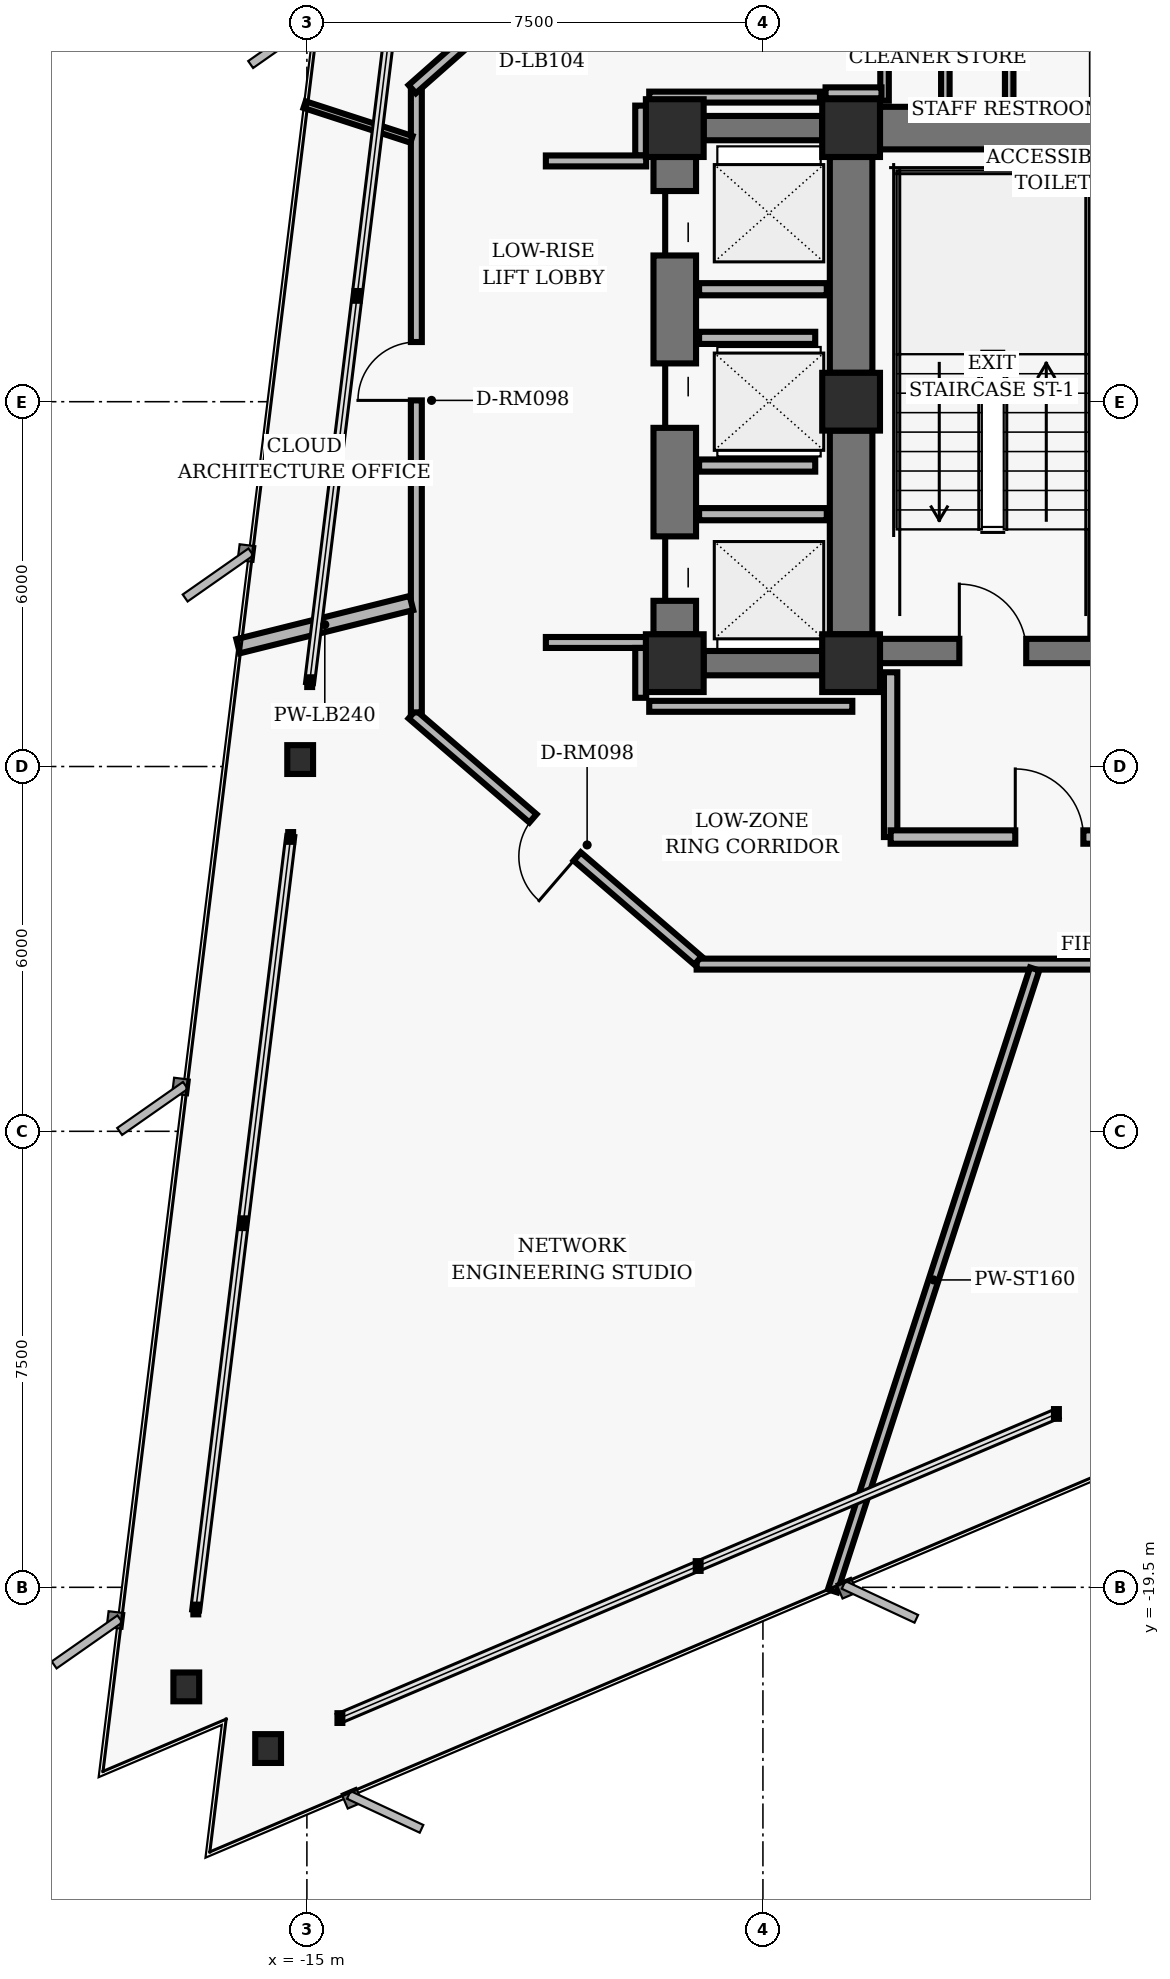
"""IFC4 building model, lengths in metres.
Left out: names, types, materials, properties, quantities, classifications, styles, units other than length and angle.
Written with IfcOpenShell. Run it as: python <this file> out.ifc"""

import sys

from ifc_helpers import new_model, si_unit, direction, frame, frame_2d, origin, origin_2d, place, context, subcontext, project, spatial, rectangle, hollow_rectangle, i_section, extrude, element, fill, save


model = new_model("IFC4")
c1 = context("Model", 3, precision=1e-05, world=origin(), true_north=direction((0.0, 1.0)))
c2 = subcontext(c1, "Body", "Model", "MODEL_VIEW")
j1 = project(units=[si_unit("LENGTHUNIT", "METRE"), si_unit("PLANEANGLEUNIT", "RADIAN")], contexts=[c1])
p1 = place(None, origin())
s1 = spatial("IfcSite", under=j1, at=p1, CompositionType="ELEMENT")
p2 = place(p1, origin())
s2 = spatial("IfcBuilding", under=s1, at=p2, CompositionType="ELEMENT")
p3 = place(p2, frame((0.0, 0.0, 52.96)))
s3 = spatial("IfcBuildingStorey", under=s2, at=p3, CompositionType="ELEMENT", Elevation=52.96)
for number, where, z_axis, x_axis in (
    (1, (-6.05, 4.5, 0.0), (0.0, 0.0, 1.0), (1.0, 0.0, 0.0)),
    (2, (-6.05, 0.0, 0.0), (0.0, 0.0, 1.0), (1.0, 0.0, 0.0)),
    (3, (-6.05, -4.3, 0.0), (0.0, 0.0, 1.0), (1.0, 0.0, 0.0)),
    (4, (-8.95, 4.5, 0.0), (0.0, 0.0, 1.0), (1.0, 0.0, 0.0)),
    (5, (-8.95, -4.3, 0.0), (0.0, 0.0, 1.0), (1.0, 0.0, 0.0)),
):
    element("IfcColumn", number, at=place(p3, frame(where, z_axis=z_axis, x_axis=x_axis)), inside=s3, PredefinedType="COLUMN", context=c2, shape_type="SweptSolid", body=[
        extrude(hollow_rectangle(XDim=0.95, YDim=0.95, WallThickness=0.06, InnerFilletRadius=0.02, OuterFilletRadius=0.04, at=origin_2d()), origin(), (0.0, 0.0, 1.0), 3.36),
    ])
p4 = place(p3, frame((-6.05, 0.475, 0.0), z_axis=(0.0, 0.0, 1.0), x_axis=(0.0, 1.0, 0.0)))
e6 = element("IfcWall", 6, at=p4, inside=s3, PredefinedType="SHEAR", context=c2, shape_type="SweptSolid", body=[
    extrude(rectangle(XDim=3.55, YDim=0.7, at=frame_2d((1.775, 0.0))), origin(), (0.0, 0.0, 1.0), 3.098),
])
p5 = place(p3, frame((-6.05, -3.825, 0.0), z_axis=(0.0, 0.0, 1.0), x_axis=(0.0, 1.0, 0.0)))
e7 = element("IfcWall", 7, at=p5, inside=s3, PredefinedType="SHEAR", context=c2, shape_type="SweptSolid", body=[
    extrude(rectangle(XDim=3.35, YDim=0.7, at=frame_2d((1.675, 0.0))), origin(), (0.0, 0.0, 1.0), 3.098),
])
p6 = place(p3, frame((-5.575, -4.1, 0.0), z_axis=(0.0, 0.0, 1.0), x_axis=(1.0, 0.0, 0.0)))
e8 = element("IfcWall", 8, at=p6, inside=s3, PredefinedType="SHEAR", context=c2, shape_type="SweptSolid", body=[
    extrude(rectangle(XDim=11.15, YDim=0.4, at=frame_2d((5.575, 0.0))), origin(), (0.0, 0.0, 1.0), 3.098),
])
p7 = place(p6, frame((1.305, 0.0, 0.0)))
e9 = element("IfcOpeningElement", 9, at=p7, cuts=e8, PredefinedType="OPENING", context=c2, shape_type="SweptSolid", body=[
    extrude(rectangle(XDim=1.1, YDim=2.04, at=frame_2d((0.55, 1.02))), frame((0.0, 0.21, 0.0), z_axis=(0.0, -1.0, 0.0), x_axis=(1.0, 0.0, 0.0)), (0.0, 0.0, 1.0), 0.42),
])
p8 = place(p6, frame((8.745, 0.0, 0.0)))
e10 = element("IfcOpeningElement", 10, at=p8, cuts=e8, PredefinedType="OPENING", context=c2, shape_type="SweptSolid", body=[
    extrude(rectangle(XDim=1.1, YDim=2.04, at=frame_2d((0.55, 1.02))), frame((0.0, 0.21, 0.0), z_axis=(0.0, -1.0, 0.0), x_axis=(1.0, 0.0, 0.0)), (0.0, 0.0, 1.0), 0.42),
])
p9 = place(p6, frame((4.045, 0.0, 0.0)))
e11 = element("IfcOpeningElement", 11, at=p9, cuts=e8, PredefinedType="OPENING", context=c2, shape_type="SweptSolid", body=[
    extrude(rectangle(XDim=1.06, YDim=2.04, at=frame_2d((0.53, 1.02))), frame((0.0, 0.21, 0.0), z_axis=(0.0, -1.0, 0.0), x_axis=(1.0, 0.0, 0.0)), (0.0, 0.0, 1.0), 0.42),
])
p10 = place(p6, frame((6.045, 0.0, 0.0)))
e12 = element("IfcOpeningElement", 12, at=p10, cuts=e8, PredefinedType="OPENING", context=c2, shape_type="SweptSolid", body=[
    extrude(rectangle(XDim=1.06, YDim=2.04, at=frame_2d((0.53, 1.02))), frame((0.0, 0.21, 0.0), z_axis=(0.0, -1.0, 0.0), x_axis=(1.0, 0.0, 0.0)), (0.0, 0.0, 1.0), 0.42),
])
p11 = place(p3, frame((-5.575, 4.5, 0.0), z_axis=(0.0, 0.0, 1.0), x_axis=(1.0, 0.0, 0.0)))
e13 = element("IfcWall", 13, at=p11, inside=s3, PredefinedType="SHEAR", context=c2, shape_type="SweptSolid", body=[
    extrude(rectangle(XDim=3.525, YDim=0.7, at=frame_2d((1.762, 0.0))), origin(), (0.0, 0.0, 1.0), 3.098),
])
p12 = place(p3, frame((-8.95, -3.825, 0.0), z_axis=(0.0, 0.0, 1.0), x_axis=(0.0, 1.0, 0.0)))
e14 = element("IfcWall", 14, at=p12, inside=s3, PredefinedType="SHEAR", context=c2, shape_type="SweptSolid", body=[
    extrude(rectangle(XDim=7.85, YDim=0.7, at=frame_2d((3.925, 0.0))), origin(), (0.0, 0.0, 1.0), 3.098),
])
p13 = place(p12, frame((0.55, 0.0, 0.0)))
e15 = element("IfcOpeningElement", 15, at=p13, cuts=e14, PredefinedType="OPENING", context=c2, shape_type="SweptSolid", body=[
    extrude(rectangle(XDim=1.06, YDim=2.04, at=frame_2d((0.53, 1.02))), frame((0.0, 0.36, 0.0), z_axis=(0.0, -1.0, 0.0), x_axis=(1.0, 0.0, 0.0)), (0.0, 0.0, 1.0), 0.72),
])
p14 = place(p12, frame((3.395, 0.0, 0.0)))
e16 = element("IfcOpeningElement", 16, at=p14, cuts=e14, PredefinedType="OPENING", context=c2, shape_type="SweptSolid", body=[
    extrude(rectangle(XDim=1.06, YDim=2.04, at=frame_2d((0.53, 1.02))), frame((0.0, 0.36, 0.0), z_axis=(0.0, -1.0, 0.0), x_axis=(1.0, 0.0, 0.0)), (0.0, 0.0, 1.0), 0.72),
])
p15 = place(p12, frame((6.23, 0.0, 0.0)))
e17 = element("IfcOpeningElement", 17, at=p15, cuts=e14, PredefinedType="OPENING", context=c2, shape_type="SweptSolid", body=[
    extrude(rectangle(XDim=1.06, YDim=2.04, at=frame_2d((0.53, 1.02))), frame((0.0, 0.36, 0.0), z_axis=(0.0, -1.0, 0.0), x_axis=(1.0, 0.0, 0.0)), (0.0, 0.0, 1.0), 0.72),
])
for number, where, z_axis, x_axis in (
    (18, (-8.475, 4.5, 0.0), (0.0, 0.0, 1.0), (1.0, 0.0, 0.0)),
    (19, (-8.475, -4.3, 0.0), (0.0, 0.0, 1.0), (1.0, 0.0, 0.0)),
):
    element("IfcWall", number, at=place(p3, frame(where, z_axis=z_axis, x_axis=x_axis)), inside=s3, PredefinedType="SHEAR", context=c2, shape_type="SweptSolid", body=[
        extrude(rectangle(XDim=1.95, YDim=0.4, at=frame_2d((0.975, 0.0))), origin(), (0.0, 0.0, 1.0), 3.098),
    ])
for number, where, z_axis, x_axis in (
    (20, (-15.111, -5.886, 0.0), (0.0, 0.0, 1.0), (1.0, 0.0, 0.0)),
    (21, (-16.983, -21.138, 0.0), (0.0, 0.0, 1.0), (1.0, 0.0, 0.0)),
    (22, (-15.638, -22.152, 0.0), (0.0, 0.0, 1.0), (1.0, 0.0, 0.0)),
):
    element("IfcColumn", number, at=place(p3, frame(where, z_axis=z_axis, x_axis=x_axis)), inside=s3, PredefinedType="COLUMN", context=c2, shape_type="SweptSolid", body=[
        extrude(i_section(OverallWidth=0.424, OverallDepth=0.474, WebThickness=0.048, FlangeThickness=0.077, FilletRadius=0.025, at=origin_2d()), origin(), (0.0, 0.0, 1.0), 3.36),
    ])
p16 = place(p3, frame((-5.4, -7.16, 0.0), z_axis=(0.0, 0.0, 1.0), x_axis=(0.0, 1.0, 0.0)))
e23 = element("IfcWall", 23, at=p16, inside=s3, PredefinedType="PARTITIONING", context=c2, shape_type="SweptSolid", body=[
    extrude(rectangle(XDim=2.71, YDim=0.22, at=frame_2d((1.355, 0.0))), origin(), (0.0, 0.0, 1.0), 3.073),
])
p17 = place(p3, frame((-5.4, -7.16, 0.0), z_axis=(0.0, 0.0, 1.0), x_axis=(1.0, 0.0, 0.0)))
e24 = element("IfcWall", 24, at=p17, inside=s3, PredefinedType="PARTITIONING", context=c2, shape_type="SweptSolid", body=[
    extrude(rectangle(XDim=5.4, YDim=0.22, at=frame_2d((2.7, 0.0))), origin(), (0.0, 0.0, 1.0), 2.587),
])
p18 = place(p17, frame((2.05, 0.0, 0.0)))
e25 = element("IfcOpeningElement", 25, at=p18, cuts=e24, PredefinedType="OPENING", context=c2, shape_type="SweptSolid", body=[
    extrude(rectangle(XDim=1.12, YDim=2.02, at=frame_2d((0.56, 1.01))), frame((0.0, 0.12, 0.0), z_axis=(0.0, -1.0, 0.0), x_axis=(1.0, 0.0, 0.0)), (0.0, 0.0, 1.0), 0.24),
])
for number, where, z_axis, x_axis in (
    (26, (-5.5, 4.95, 0.0), (0.0, 0.0, 1.0), (0.0, 1.0, 0.0)),
    (27, (-4.5, 4.95, 0.0), (0.0, 0.0, 1.0), (0.0, 1.0, 0.0)),
    (28, (-3.45, 4.95, 0.0), (0.0, 0.0, 1.0), (0.0, 1.0, 0.0)),
):
    element("IfcWall", number, at=place(p3, frame(where, z_axis=z_axis, x_axis=x_axis)), inside=s3, PredefinedType="PARTITIONING", context=c2, shape_type="SweptSolid", body=[
        extrude(rectangle(XDim=2.1, YDim=0.14, at=frame_2d((1.05, 0.0))), origin(), (0.0, 0.0, 1.0), 3.073),
    ])
for number, where, z_axis, x_axis in (
    (29, (-8.55, -1.85, 0.0), (0.0, 0.0, 1.0), (1.0, 0.0, 0.0)),
    (30, (-8.55, 1.85, 0.0), (0.0, 0.0, 1.0), (1.0, 0.0, 0.0)),
):
    element("IfcWall", number, at=place(p3, frame(where, z_axis=z_axis, x_axis=x_axis)), inside=s3, PredefinedType="PARTITIONING", context=c2, shape_type="SweptSolid", body=[
        extrude(rectangle(XDim=2.1, YDim=0.2, at=frame_2d((1.05, 0.0))), origin(), (0.0, 0.0, 1.0), 3.073),
    ])
for number, where, z_axis, x_axis in (
    (31, (-8.55, -1.05, 0.0), (0.0, 0.0, 1.0), (1.0, 0.0, 0.0)),
    (32, (-8.55, 1.05, 0.0), (0.0, 0.0, 1.0), (1.0, 0.0, 0.0)),
):
    element("IfcWall", number, at=place(p3, frame(where, z_axis=z_axis, x_axis=x_axis)), inside=s3, PredefinedType="PARTITIONING", context=c2, shape_type="SweptSolid", body=[
        extrude(rectangle(XDim=1.91, YDim=0.2, at=frame_2d((0.955, 0.0))), origin(), (0.0, 0.0, 1.0), 3.073),
    ])
p19 = place(p3, frame((8.41, -9.25, 0.0), z_axis=(0.0, 0.0, 1.0), x_axis=(-1.0, 0.0, 0.0)))
e33 = element("IfcWall", 33, at=p19, inside=s3, PredefinedType="PARTITIONING", context=c2, shape_type="SweptSolid", body=[
    extrude(rectangle(XDim=17.0, YDim=0.18, at=frame_2d((8.5, 0.0))), origin(), (0.0, 0.0, 1.0), 2.587),
])
p20 = place(p19, frame((5.34, 0.0, 0.0)))
e34 = element("IfcOpeningElement", 34, at=p20, cuts=e33, PredefinedType="OPENING", context=c2, shape_type="SweptSolid", body=[
    extrude(rectangle(XDim=1.02, YDim=2.02, at=frame_2d((0.51, 1.01))), frame((0.0, 0.1, 0.0), z_axis=(0.0, -1.0, 0.0), x_axis=(1.0, 0.0, 0.0)), (0.0, 0.0, 1.0), 0.2),
])
p21 = place(p3, frame((-8.568, -9.191, 0.0), z_axis=(0.0, 0.0, 1.0), x_axis=(-0.757556899173, 0.652769135694, 0.0)))
e35 = element("IfcWall", 35, at=p21, inside=s3, PredefinedType="PARTITIONING", context=c2, shape_type="SweptSolid", body=[
    extrude(rectangle(XDim=6.204, YDim=0.18, at=frame_2d((3.102, 0.0))), origin(), (0.0, 0.0, 1.0), 3.073),
])
p22 = place(p21, frame((2.622, 0.0, 0.0)))
e36 = element("IfcOpeningElement", 36, at=p22, cuts=e35, PredefinedType="OPENING", context=c2, shape_type="SweptSolid", body=[
    extrude(rectangle(XDim=0.96, YDim=2.02, at=frame_2d((0.48, 1.01))), frame((0.0, 0.1, 0.0), z_axis=(0.0, -1.0, 0.0), x_axis=(1.0, 0.0, 0.0)), (0.0, 0.0, 1.0), 0.2),
])
p23 = place(p3, frame((-13.2, -5.11, 0.0), z_axis=(0.0, 0.0, 1.0), x_axis=(0.0, 1.0, 0.0)))
e37 = element("IfcWall", 37, at=p23, inside=s3, PredefinedType="PARTITIONING", context=c2, shape_type="SweptSolid", body=[
    extrude(rectangle(XDim=10.22, YDim=0.18, at=frame_2d((5.11, 0.0))), origin(), (0.0, 0.0, 1.0), 2.587),
])
p24 = place(p23, frame((5.132, 0.0, 0.0)))
e38 = element("IfcOpeningElement", 38, at=p24, cuts=e37, PredefinedType="OPENING", context=c2, shape_type="SweptSolid", body=[
    extrude(rectangle(XDim=0.96, YDim=2.02, at=frame_2d((0.48, 1.01))), frame((0.0, 0.1, 0.0), z_axis=(0.0, -1.0, 0.0), x_axis=(1.0, 0.0, 0.0)), (0.0, 0.0, 1.0), 0.2),
])
p25 = place(p3, frame((-13.268, 5.14, 0.0), z_axis=(0.0, 0.0, 1.0), x_axis=(0.749626463267, 0.66186113768, 0.0)))
e39 = element("IfcWall", 39, at=p25, inside=s3, PredefinedType="PARTITIONING", context=c2, shape_type="SweptSolid", body=[
    extrude(rectangle(XDim=6.27, YDim=0.18, at=frame_2d((3.135, 0.0))), origin(), (0.0, 0.0, 1.0), 3.073),
])
p26 = place(p25, frame((2.625, 0.0, 0.0)))
e40 = element("IfcOpeningElement", 40, at=p26, cuts=e39, PredefinedType="OPENING", context=c2, shape_type="SweptSolid", body=[
    extrude(rectangle(XDim=1.02, YDim=2.02, at=frame_2d((0.51, 1.01))), frame((0.0, 0.1, 0.0), z_axis=(0.0, -1.0, 0.0), x_axis=(1.0, 0.0, 0.0)), (0.0, 0.0, 1.0), 0.2),
])
p27 = place(p3, frame((-9.51, 4.87, 0.0), z_axis=(0.0, 0.0, 1.0), x_axis=(0.0, -1.0, 0.0)))
e41 = element("IfcWall", 41, at=p27, inside=s3, PredefinedType="PARTITIONING", context=c2, shape_type="SweptSolid", body=[
    extrude(rectangle(XDim=0.82, YDim=0.18, at=frame_2d((0.41, 0.0))), origin(), (0.0, 0.0, 1.0), 3.073),
])
for number, where, z_axis, x_axis in (
    (42, (-9.42, 3.96, 0.0), (0.0, 0.0, 1.0), (-1.0, 0.0, 0.0)),
    (43, (-11.07, -3.96, 0.0), (0.0, 0.0, 1.0), (1.0, 0.0, 0.0)),
):
    element("IfcWall", number, at=place(p3, frame(where, z_axis=z_axis, x_axis=x_axis)), inside=s3, PredefinedType="PARTITIONING", context=c2, shape_type="SweptSolid", body=[
        extrude(rectangle(XDim=1.65, YDim=0.18, at=frame_2d((0.825, 0.0))), origin(), (0.0, 0.0, 1.0), 3.073),
    ])
p28 = place(p3, frame((-9.51, -4.05, 0.0), z_axis=(0.0, 0.0, 1.0), x_axis=(0.0, -1.0, 0.0)))
e44 = element("IfcWall", 44, at=p28, inside=s3, PredefinedType="PARTITIONING", context=c2, shape_type="SweptSolid", body=[
    extrude(rectangle(XDim=0.82, YDim=0.18, at=frame_2d((0.41, 0.0))), origin(), (0.0, 0.0, 1.0), 3.073),
])
p29 = place(p3, frame((-9.37, -5.01, 0.0), z_axis=(0.0, 0.0, 1.0), x_axis=(1.0, 0.0, 0.0)))
e45 = element("IfcWall", 45, at=p29, inside=s3, PredefinedType="PARTITIONING", context=c2, shape_type="SweptSolid", body=[
    extrude(rectangle(XDim=3.34, YDim=0.18, at=frame_2d((1.67, 0.0))), origin(), (0.0, 0.0, 1.0), 3.073),
])
p30 = place(p3, frame((-5.55, 5.08, 0.0), z_axis=(0.0, 0.0, 1.0), x_axis=(-1.0, 0.0, 0.0)))
e46 = element("IfcWall", 46, at=p30, inside=s3, PredefinedType="PARTITIONING", context=c2, shape_type="SweptSolid", body=[
    extrude(rectangle(XDim=0.92, YDim=0.18, at=frame_2d((0.46, 0.0))), origin(), (0.0, 0.0, 1.0), 3.073),
])
p31 = place(p3, frame((-6.562, 5.01, 0.0), z_axis=(0.0, 0.0, 1.0), x_axis=(-1.0, 0.0, 0.0)))
e47 = element("IfcWall", 47, at=p31, inside=s3, PredefinedType="PARTITIONING", context=c2, shape_type="SweptSolid", body=[
    extrude(rectangle(XDim=2.808, YDim=0.18, at=frame_2d((1.404, 0.0))), origin(), (0.0, 0.0, 1.0), 3.073),
])
p32 = place(p3, frame((-13.28, -3.311, 0.0), z_axis=(0.0, 0.0, 1.0), x_axis=(-0.970288946824, -0.241949084873, 0.0)))
e48 = element("IfcWall", 48, at=p32, inside=s3, PredefinedType="PARTITIONING", context=c2, shape_type="SweptSolid", body=[
    extrude(rectangle(XDim=2.938, YDim=0.24, at=frame_2d((1.469, 0.0))), origin(), (0.0, 0.0, 1.0), 3.073),
])
p33 = place(p3, frame((-3.031, -9.33, 0.0), z_axis=(0.0, 0.0, 1.0), x_axis=(-0.309020370084, -0.951055419454, 0.0)))
e49 = element("IfcWall", 49, at=p33, inside=s3, PredefinedType="PARTITIONING", context=c2, shape_type="SweptSolid", body=[
    extrude(rectangle(XDim=10.755, YDim=0.16, at=frame_2d((5.377, 0.0))), origin(), (0.0, 0.0, 1.0), 3.073),
])
p34 = place(p3, frame((-13.28, 4.315, 0.0), z_axis=(0.0, 0.0, 1.0), x_axis=(-0.951047661396, 0.309044245624, 0.0)))
e50 = element("IfcWall", 50, at=p34, inside=s3, PredefinedType="MOVABLE", context=c2, shape_type="SweptSolid", body=[
    extrude(rectangle(XDim=1.848, YDim=0.115, at=frame_2d((0.924, 0.0))), origin(), (0.0, 0.0, 1.0), 3.073),
])
p35 = place(p7, origin())
e51 = element("IfcDoor", 51, at=p35, inside=s3, OperationType="SINGLE_SWING_LEFT", PredefinedType="DOOR", context=c2, shape_type="SweptSolid", body=[
    extrude(rectangle(XDim=1.1, YDim=2.04, at=frame_2d((0.55, 1.02))), frame((0.0, 0.025, 0.0), z_axis=(0.0, -1.0, 0.0), x_axis=(1.0, 0.0, 0.0)), (0.0, 0.0, 1.0), 0.05),
])
fill(e9, e51)
p36 = place(p18, origin())
e52 = element("IfcDoor", 52, at=p36, inside=s3, OperationType="SINGLE_SWING_LEFT", PredefinedType="DOOR", context=c2, shape_type="SweptSolid", body=[
    extrude(rectangle(XDim=1.12, YDim=2.02, at=frame_2d((0.56, 1.01))), frame((0.0, 0.025, 0.0), z_axis=(0.0, -1.0, 0.0), x_axis=(1.0, 0.0, 0.0)), (0.0, 0.0, 1.0), 0.05),
])
fill(e25, e52)
p37 = place(p13, origin())
e53 = element("IfcDoor", 53, at=p37, inside=s3, OperationType="SLIDING_TO_LEFT", PredefinedType="DOOR", context=c2, shape_type="SweptSolid", body=[
    extrude(rectangle(XDim=1.06, YDim=2.04, at=frame_2d((0.53, 1.02))), frame((0.0, 0.025, 0.0), z_axis=(0.0, -1.0, 0.0), x_axis=(1.0, 0.0, 0.0)), (0.0, 0.0, 1.0), 0.05),
])
fill(e15, e53)
p38 = place(p14, origin())
e54 = element("IfcDoor", 54, at=p38, inside=s3, OperationType="SLIDING_TO_RIGHT", PredefinedType="DOOR", context=c2, shape_type="SweptSolid", body=[
    extrude(rectangle(XDim=1.06, YDim=2.04, at=frame_2d((0.53, 1.02))), frame((0.0, 0.025, 0.0), z_axis=(0.0, -1.0, 0.0), x_axis=(1.0, 0.0, 0.0)), (0.0, 0.0, 1.0), 0.05),
])
fill(e16, e54)
p39 = place(p15, origin())
e55 = element("IfcDoor", 55, at=p39, inside=s3, OperationType="SLIDING_TO_LEFT", PredefinedType="DOOR", context=c2, shape_type="SweptSolid", body=[
    extrude(rectangle(XDim=1.06, YDim=2.04, at=frame_2d((0.53, 1.02))), frame((0.0, 0.025, 0.0), z_axis=(0.0, -1.0, 0.0), x_axis=(1.0, 0.0, 0.0)), (0.0, 0.0, 1.0), 0.05),
])
fill(e17, e55)
p40 = place(p22, origin())
e56 = element("IfcDoor", 56, at=p40, inside=s3, OperationType="SINGLE_SWING_LEFT", PredefinedType="DOOR", context=c2, shape_type="SweptSolid", body=[
    extrude(rectangle(XDim=0.96, YDim=2.02, at=frame_2d((0.48, 1.01))), frame((0.0, 0.025, 0.0), z_axis=(0.0, -1.0, 0.0), x_axis=(1.0, 0.0, 0.0)), (0.0, 0.0, 1.0), 0.05),
])
fill(e36, e56)
p41 = place(p24, origin())
e57 = element("IfcDoor", 57, at=p41, inside=s3, OperationType="SINGLE_SWING_LEFT", PredefinedType="DOOR", context=c2, shape_type="SweptSolid", body=[
    extrude(rectangle(XDim=0.96, YDim=2.02, at=frame_2d((0.48, 1.01))), frame((0.0, 0.025, 0.0), z_axis=(0.0, -1.0, 0.0), x_axis=(1.0, 0.0, 0.0)), (0.0, 0.0, 1.0), 0.05),
])
fill(e38, e57)
save(model, sys.argv[1])
